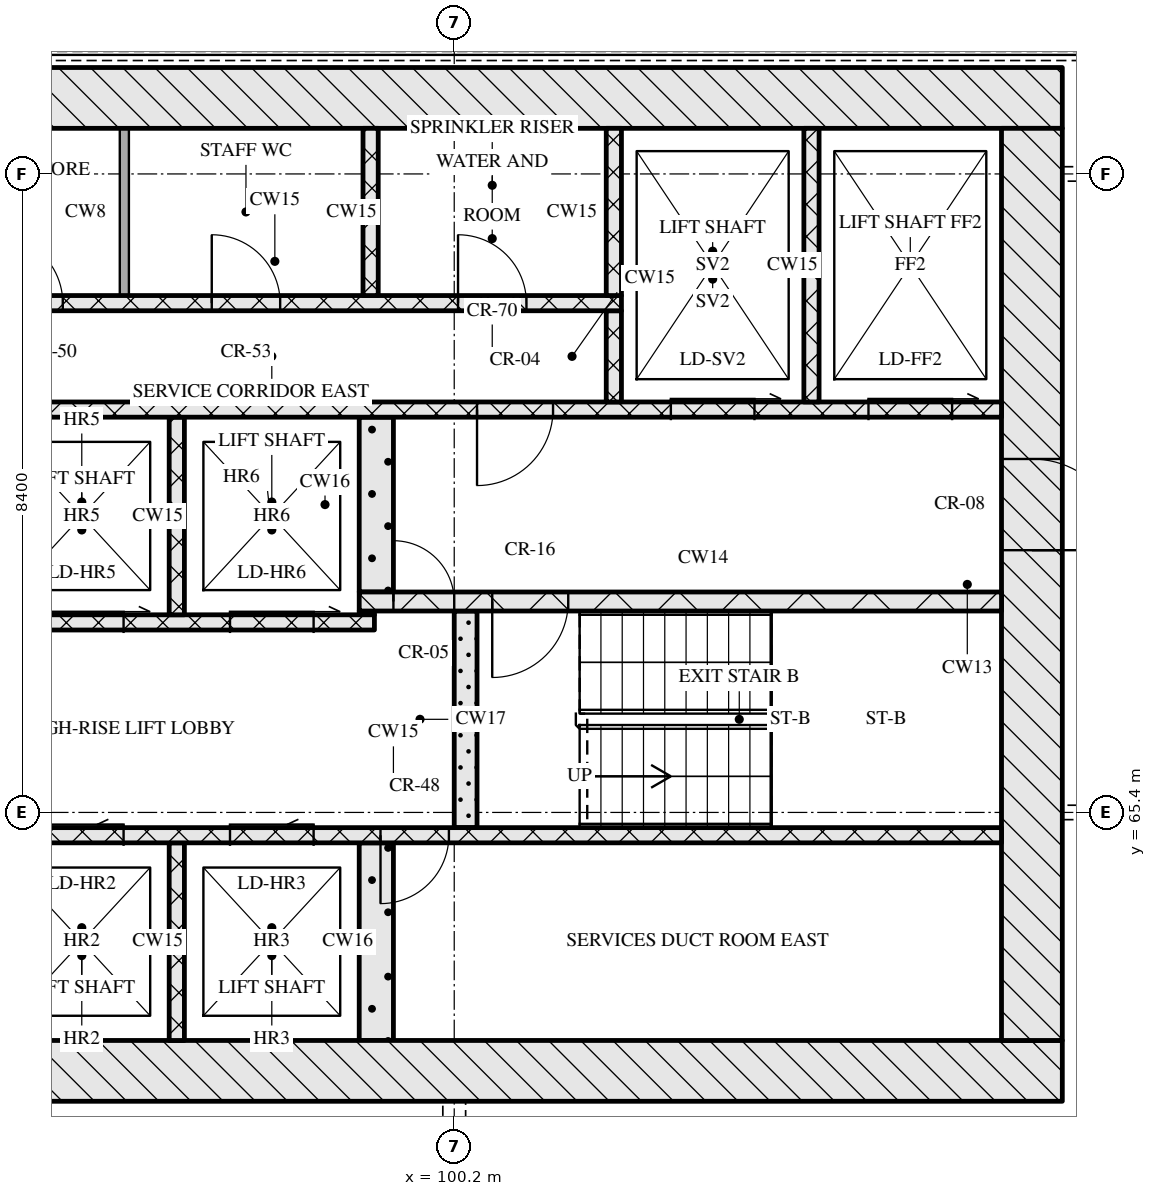
"""IFC4 building model, lengths in metres.
Left out: names, types, materials, properties, quantities, classifications, styles, units other than length and angle.
Written with IfcOpenShell. Run it as: python <this file> out.ifc"""

import sys

from ifc_helpers import new_model, si_unit, direction, frame, frame_2d, origin, place, context, subcontext, project, spatial, rectangle, extrude, element, fill, save


model = new_model("IFC4")
c1 = context("Model", 3, precision=1e-05, world=origin(), true_north=direction((0.0, 1.0)))
c2 = subcontext(c1, "Body", "Model", "MODEL_VIEW")
j1 = project(units=[si_unit("LENGTHUNIT", "METRE"), si_unit("PLANEANGLEUNIT", "RADIAN")], contexts=[c1])
p1 = place(None, origin())
s1 = spatial("IfcSite", under=j1, at=p1, CompositionType="ELEMENT")
p2 = place(p1, origin())
s2 = spatial("IfcBuilding", under=s1, at=p2, CompositionType="ELEMENT")
p3 = place(p2, frame((0.0, 0.0, 154.65)))
s3 = spatial("IfcBuildingStorey", under=s2, at=p3, CompositionType="ELEMENT", Elevation=154.65)
p4 = place(p3, frame((67.0, 62.0, 0.0), z_axis=(0.0, 0.0, 1.0), x_axis=(1.0, 0.0, 0.0)))
e1 = element("IfcWall", 1, at=p4, inside=s3, PredefinedType="SOLIDWALL", context=c2, shape_type="SweptSolid", body=[
    extrude(rectangle(XDim=41.2, YDim=0.8, at=frame_2d((20.6, 0.0))), origin(), (0.0, 0.0, 1.0), 3.32),
])
p5 = place(p4, frame((20.95, 0.0, 0.0)))
e2 = element("IfcOpeningElement", 2, at=p5, cuts=e1, PredefinedType="OPENING", context=c2, shape_type="SweptSolid", body=[
    extrude(rectangle(XDim=1.8, YDim=2.1, at=frame_2d((0.9, 1.05))), frame((0.0, 0.41, 0.0), z_axis=(0.0, -1.0, 0.0), x_axis=(1.0, 0.0, 0.0)), (0.0, 0.0, 1.0), 0.82),
])
p6 = place(p3, frame((67.0, 74.8, 0.0), z_axis=(0.0, 0.0, 1.0), x_axis=(1.0, 0.0, 0.0)))
e3 = element("IfcWall", 3, at=p6, inside=s3, PredefinedType="SOLIDWALL", context=c2, shape_type="SweptSolid", body=[
    extrude(rectangle(XDim=41.2, YDim=0.8, at=frame_2d((20.6, 0.0))), origin(), (0.0, 0.0, 1.0), 3.32),
])
p7 = place(p3, frame((107.8, 62.4, 0.0), z_axis=(0.0, 0.0, 1.0), x_axis=(0.0, 1.0, 0.0)))
e4 = element("IfcWall", 4, at=p7, inside=s3, PredefinedType="SOLIDWALL", context=c2, shape_type="SweptSolid", body=[
    extrude(rectangle(XDim=12.0, YDim=0.8, at=frame_2d((6.0, 0.0))), origin(), (0.0, 0.0, 1.0), 3.32),
])
p8 = place(p7, frame((6.45, 0.0, 0.0)))
e5 = element("IfcOpeningElement", 5, at=p8, cuts=e4, PredefinedType="OPENING", context=c2, shape_type="SweptSolid", body=[
    extrude(rectangle(XDim=1.2, YDim=2.1, at=frame_2d((0.6, 1.05))), frame((0.0, 0.41, 0.0), z_axis=(0.0, -1.0, 0.0), x_axis=(1.0, 0.0, 0.0)), (0.0, 0.0, 1.0), 0.82),
])
p9 = place(p3, frame((96.55, 62.4, 0.0), z_axis=(0.0, 0.0, 1.0), x_axis=(0.0, 1.0, 0.0)))
e6 = element("IfcWall", 6, at=p9, inside=s3, PredefinedType="SOLIDWALL", context=c2, shape_type="SweptSolid", body=[
    extrude(rectangle(XDim=2.6, YDim=0.2, at=frame_2d((1.3, 0.0))), origin(), (0.0, 0.0, 1.0), 3.32),
])
p10 = place(p3, frame((99.175, 62.4, 0.0), z_axis=(0.0, 0.0, 1.0), x_axis=(0.0, 1.0, 0.0)))
e7 = element("IfcWall", 7, at=p10, inside=s3, PredefinedType="SOLIDWALL", context=c2, shape_type="SweptSolid", body=[
    extrude(rectangle(XDim=2.6, YDim=0.45, at=frame_2d((1.3, 0.0))), origin(), (0.0, 0.0, 1.0), 3.32),
])
p11 = place(p3, frame((91.4, 65.1, 0.0), z_axis=(0.0, 0.0, 1.0), x_axis=(1.0, 0.0, 0.0)))
e8 = element("IfcWall", 8, at=p11, inside=s3, PredefinedType="SOLIDWALL", context=c2, shape_type="SweptSolid", body=[
    extrude(rectangle(XDim=16.0, YDim=0.2, at=frame_2d((8.0, 0.0))), origin(), (0.0, 0.0, 1.0), 3.32),
])
p12 = place(p11, frame((0.85, 0.0, 0.0)))
e9 = element("IfcOpeningElement", 9, at=p12, cuts=e8, PredefinedType="OPENING", context=c2, shape_type="SweptSolid", body=[
    extrude(rectangle(XDim=1.1, YDim=2.1, at=frame_2d((0.55, 1.05))), frame((0.0, 0.11, 0.0), z_axis=(0.0, -1.0, 0.0), x_axis=(1.0, 0.0, 0.0)), (0.0, 0.0, 1.0), 0.22),
])
p13 = place(p11, frame((3.35, 0.0, 0.0)))
e10 = element("IfcOpeningElement", 10, at=p13, cuts=e8, PredefinedType="OPENING", context=c2, shape_type="SweptSolid", body=[
    extrude(rectangle(XDim=1.1, YDim=2.1, at=frame_2d((0.55, 1.05))), frame((0.0, 0.11, 0.0), z_axis=(0.0, -1.0, 0.0), x_axis=(1.0, 0.0, 0.0)), (0.0, 0.0, 1.0), 0.22),
])
p14 = place(p11, frame((5.85, 0.0, 0.0)))
e11 = element("IfcOpeningElement", 11, at=p14, cuts=e8, PredefinedType="OPENING", context=c2, shape_type="SweptSolid", body=[
    extrude(rectangle(XDim=1.1, YDim=2.1, at=frame_2d((0.55, 1.05))), frame((0.0, 0.11, 0.0), z_axis=(0.0, -1.0, 0.0), x_axis=(1.0, 0.0, 0.0)), (0.0, 0.0, 1.0), 0.22),
])
p15 = place(p11, frame((7.83, 0.0, 0.0)))
e12 = element("IfcOpeningElement", 12, at=p15, cuts=e8, PredefinedType="OPENING", context=c2, shape_type="SweptSolid", body=[
    extrude(rectangle(XDim=0.9, YDim=2.1, at=frame_2d((0.45, 1.05))), frame((0.0, 0.11, 0.0), z_axis=(0.0, -1.0, 0.0), x_axis=(1.0, 0.0, 0.0)), (0.0, 0.0, 1.0), 0.22),
])
p16 = place(p3, frame((100.35, 65.2, 0.0), z_axis=(0.0, 0.0, 1.0), x_axis=(0.0, 1.0, 0.0)))
e13 = element("IfcWall", 13, at=p16, inside=s3, PredefinedType="SOLIDWALL", context=c2, shape_type="SweptSolid", body=[
    extrude(rectangle(XDim=2.85, YDim=0.3, at=frame_2d((1.425, 0.0))), origin(), (0.0, 0.0, 1.0), 3.32),
])
p17 = place(p3, frame((76.05, 67.9, 0.0), z_axis=(0.0, 0.0, 1.0), x_axis=(1.0, 0.0, 0.0)))
e14 = element("IfcWall", 14, at=p17, inside=s3, PredefinedType="SOLIDWALL", context=c2, shape_type="SweptSolid", body=[
    extrude(rectangle(XDim=23.1, YDim=0.2, at=frame_2d((11.55, 0.0))), origin(), (0.0, 0.0, 1.0), 3.32),
])
p18 = place(p17, frame((1.4, 0.0, 0.0)))
e15 = element("IfcOpeningElement", 15, at=p18, cuts=e14, PredefinedType="OPENING", context=c2, shape_type="SweptSolid", body=[
    extrude(rectangle(XDim=0.9, YDim=2.1, at=frame_2d((0.45, 1.05))), frame((0.0, 0.11, 0.0), z_axis=(0.0, -1.0, 0.0), x_axis=(1.0, 0.0, 0.0)), (0.0, 0.0, 1.0), 0.22),
])
p19 = place(p17, frame((5.11, 0.0, 0.0)))
e16 = element("IfcOpeningElement", 16, at=p19, cuts=e14, PredefinedType="OPENING", context=c2, shape_type="SweptSolid", body=[
    extrude(rectangle(XDim=0.9, YDim=2.1, at=frame_2d((0.45, 1.05))), frame((0.0, 0.11, 0.0), z_axis=(0.0, -1.0, 0.0), x_axis=(1.0, 0.0, 0.0)), (0.0, 0.0, 1.0), 0.22),
])
p20 = place(p17, frame((8.45, 0.0, 0.0)))
e17 = element("IfcOpeningElement", 17, at=p20, cuts=e14, PredefinedType="OPENING", context=c2, shape_type="SweptSolid", body=[
    extrude(rectangle(XDim=0.9, YDim=2.1, at=frame_2d((0.45, 1.05))), frame((0.0, 0.11, 0.0), z_axis=(0.0, -1.0, 0.0), x_axis=(1.0, 0.0, 0.0)), (0.0, 0.0, 1.0), 0.22),
])
p21 = place(p17, frame((10.91, 0.0, 0.0)))
e18 = element("IfcOpeningElement", 18, at=p21, cuts=e14, PredefinedType="OPENING", context=c2, shape_type="SweptSolid", body=[
    extrude(rectangle(XDim=0.9, YDim=2.1, at=frame_2d((0.45, 1.05))), frame((0.0, 0.11, 0.0), z_axis=(0.0, -1.0, 0.0), x_axis=(1.0, 0.0, 0.0)), (0.0, 0.0, 1.0), 0.22),
])
p22 = place(p17, frame((13.55, 0.0, 0.0)))
e19 = element("IfcOpeningElement", 19, at=p22, cuts=e14, PredefinedType="OPENING", context=c2, shape_type="SweptSolid", body=[
    extrude(rectangle(XDim=1.0, YDim=2.1, at=frame_2d((0.5, 1.05))), frame((0.0, 0.11, 0.0), z_axis=(0.0, -1.0, 0.0), x_axis=(1.0, 0.0, 0.0)), (0.0, 0.0, 1.0), 0.22),
])
p23 = place(p17, frame((16.2, 0.0, 0.0)))
e20 = element("IfcOpeningElement", 20, at=p23, cuts=e14, PredefinedType="OPENING", context=c2, shape_type="SweptSolid", body=[
    extrude(rectangle(XDim=1.1, YDim=2.1, at=frame_2d((0.55, 1.05))), frame((0.0, 0.11, 0.0), z_axis=(0.0, -1.0, 0.0), x_axis=(1.0, 0.0, 0.0)), (0.0, 0.0, 1.0), 0.22),
])
p24 = place(p17, frame((18.7, 0.0, 0.0)))
e21 = element("IfcOpeningElement", 21, at=p24, cuts=e14, PredefinedType="OPENING", context=c2, shape_type="SweptSolid", body=[
    extrude(rectangle(XDim=1.1, YDim=2.1, at=frame_2d((0.55, 1.05))), frame((0.0, 0.11, 0.0), z_axis=(0.0, -1.0, 0.0), x_axis=(1.0, 0.0, 0.0)), (0.0, 0.0, 1.0), 0.22),
])
p25 = place(p17, frame((21.2, 0.0, 0.0)))
e22 = element("IfcOpeningElement", 22, at=p25, cuts=e14, PredefinedType="OPENING", context=c2, shape_type="SweptSolid", body=[
    extrude(rectangle(XDim=1.1, YDim=2.1, at=frame_2d((0.55, 1.05))), frame((0.0, 0.11, 0.0), z_axis=(0.0, -1.0, 0.0), x_axis=(1.0, 0.0, 0.0)), (0.0, 0.0, 1.0), 0.22),
])
p26 = place(p3, frame((96.55, 68.0, 0.0), z_axis=(0.0, 0.0, 1.0), x_axis=(0.0, 1.0, 0.0)))
e23 = element("IfcWall", 23, at=p26, inside=s3, PredefinedType="SOLIDWALL", context=c2, shape_type="SweptSolid", body=[
    extrude(rectangle(XDim=2.6, YDim=0.2, at=frame_2d((1.3, 0.0))), origin(), (0.0, 0.0, 1.0), 3.32),
])
p27 = place(p3, frame((98.95, 68.025, 0.0), z_axis=(0.0, 0.0, 1.0), x_axis=(1.0, 0.0, 0.0)))
e24 = element("IfcWall", 24, at=p27, inside=s3, PredefinedType="SOLIDWALL", context=c2, shape_type="SweptSolid", body=[
    extrude(rectangle(XDim=0.2, YDim=0.05, at=frame_2d((0.1, 0.0))), origin(), (0.0, 0.0, 1.0), 3.32),
])
p28 = place(p3, frame((98.95, 68.175, 0.0), z_axis=(0.0, 0.0, 1.0), x_axis=(1.0, 0.0, 0.0)))
e25 = element("IfcWall", 25, at=p28, inside=s3, PredefinedType="SOLIDWALL", context=c2, shape_type="SweptSolid", body=[
    extrude(rectangle(XDim=8.45, YDim=0.25, at=frame_2d((4.225, 0.0))), origin(), (0.0, 0.0, 1.0), 3.32),
])
p29 = place(p28, frame((0.45, 0.0, 0.0)))
e26 = element("IfcOpeningElement", 26, at=p29, cuts=e25, PredefinedType="OPENING", context=c2, shape_type="SweptSolid", body=[
    extrude(rectangle(XDim=0.8, YDim=2.1, at=frame_2d((0.4, 1.05))), frame((0.0, 0.135, 0.0), z_axis=(0.0, -1.0, 0.0), x_axis=(1.0, 0.0, 0.0)), (0.0, 0.0, 1.0), 0.27),
])
p30 = place(p28, frame((1.75, 0.0, 0.0)))
e27 = element("IfcOpeningElement", 27, at=p30, cuts=e25, PredefinedType="OPENING", context=c2, shape_type="SweptSolid", body=[
    extrude(rectangle(XDim=1.0, YDim=2.1, at=frame_2d((0.5, 1.05))), frame((0.0, 0.135, 0.0), z_axis=(0.0, -1.0, 0.0), x_axis=(1.0, 0.0, 0.0)), (0.0, 0.0, 1.0), 0.27),
])
p31 = place(p3, frame((99.175, 68.3, 0.0), z_axis=(0.0, 0.0, 1.0), x_axis=(0.0, 1.0, 0.0)))
e28 = element("IfcWall", 28, at=p31, inside=s3, PredefinedType="SOLIDWALL", context=c2, shape_type="SweptSolid", body=[
    extrude(rectangle(XDim=2.3, YDim=0.45, at=frame_2d((1.15, 0.0))), origin(), (0.0, 0.0, 1.0), 3.32),
])
p32 = place(p3, frame((67.8, 70.7, 0.0), z_axis=(0.0, 0.0, 1.0), x_axis=(1.0, 0.0, 0.0)))
e29 = element("IfcWall", 29, at=p32, inside=s3, PredefinedType="SOLIDWALL", context=c2, shape_type="SweptSolid", body=[
    extrude(rectangle(XDim=39.6, YDim=0.2, at=frame_2d((19.8, 0.0))), origin(), (0.0, 0.0, 1.0), 3.32),
])
p33 = place(p32, frame((0.65, 0.0, 0.0)))
e30 = element("IfcOpeningElement", 30, at=p33, cuts=e29, PredefinedType="OPENING", context=c2, shape_type="SweptSolid", body=[
    extrude(rectangle(XDim=1.1, YDim=2.1, at=frame_2d((0.55, 1.05))), frame((0.0, 0.11, 0.0), z_axis=(0.0, -1.0, 0.0), x_axis=(1.0, 0.0, 0.0)), (0.0, 0.0, 1.0), 0.22),
])
p34 = place(p32, frame((3.25, 0.0, 0.0)))
e31 = element("IfcOpeningElement", 31, at=p34, cuts=e29, PredefinedType="OPENING", context=c2, shape_type="SweptSolid", body=[
    extrude(rectangle(XDim=1.1, YDim=2.1, at=frame_2d((0.55, 1.05))), frame((0.0, 0.11, 0.0), z_axis=(0.0, -1.0, 0.0), x_axis=(1.0, 0.0, 0.0)), (0.0, 0.0, 1.0), 0.22),
])
p35 = place(p32, frame((5.9, 0.0, 0.0)))
e32 = element("IfcOpeningElement", 32, at=p35, cuts=e29, PredefinedType="OPENING", context=c2, shape_type="SweptSolid", body=[
    extrude(rectangle(XDim=1.0, YDim=2.1, at=frame_2d((0.5, 1.05))), frame((0.0, 0.11, 0.0), z_axis=(0.0, -1.0, 0.0), x_axis=(1.0, 0.0, 0.0)), (0.0, 0.0, 1.0), 0.22),
])
p36 = place(p32, frame((21.7, 0.0, 0.0)))
e33 = element("IfcOpeningElement", 33, at=p36, cuts=e29, PredefinedType="OPENING", context=c2, shape_type="SweptSolid", body=[
    extrude(rectangle(XDim=1.0, YDim=2.1, at=frame_2d((0.5, 1.05))), frame((0.0, 0.11, 0.0), z_axis=(0.0, -1.0, 0.0), x_axis=(1.0, 0.0, 0.0)), (0.0, 0.0, 1.0), 0.22),
])
p37 = place(p32, frame((32.7, 0.0, 0.0)))
e34 = element("IfcOpeningElement", 34, at=p37, cuts=e29, PredefinedType="OPENING", context=c2, shape_type="SweptSolid", body=[
    extrude(rectangle(XDim=1.0, YDim=2.1, at=frame_2d((0.5, 1.05))), frame((0.0, 0.11, 0.0), z_axis=(0.0, -1.0, 0.0), x_axis=(1.0, 0.0, 0.0)), (0.0, 0.0, 1.0), 0.22),
])
p38 = place(p32, frame((35.25, 0.0, 0.0)))
e35 = element("IfcOpeningElement", 35, at=p38, cuts=e29, PredefinedType="OPENING", context=c2, shape_type="SweptSolid", body=[
    extrude(rectangle(XDim=1.1, YDim=2.1, at=frame_2d((0.55, 1.05))), frame((0.0, 0.11, 0.0), z_axis=(0.0, -1.0, 0.0), x_axis=(1.0, 0.0, 0.0)), (0.0, 0.0, 1.0), 0.22),
])
p39 = place(p32, frame((37.85, 0.0, 0.0)))
e36 = element("IfcOpeningElement", 36, at=p39, cuts=e29, PredefinedType="OPENING", context=c2, shape_type="SweptSolid", body=[
    extrude(rectangle(XDim=1.1, YDim=2.1, at=frame_2d((0.55, 1.05))), frame((0.0, 0.11, 0.0), z_axis=(0.0, -1.0, 0.0), x_axis=(1.0, 0.0, 0.0)), (0.0, 0.0, 1.0), 0.22),
])
p40 = place(p3, frame((102.3, 70.8, 0.0), z_axis=(0.0, 0.0, 1.0), x_axis=(0.0, 1.0, 0.0)))
e37 = element("IfcWall", 37, at=p40, inside=s3, PredefinedType="SOLIDWALL", context=c2, shape_type="SweptSolid", body=[
    extrude(rectangle(XDim=1.2, YDim=0.2, at=frame_2d((0.6, 0.0))), origin(), (0.0, 0.0, 1.0), 3.32),
])
p41 = place(p3, frame((104.9, 70.8, 0.0), z_axis=(0.0, 0.0, 1.0), x_axis=(0.0, 1.0, 0.0)))
e38 = element("IfcWall", 38, at=p41, inside=s3, PredefinedType="SOLIDWALL", context=c2, shape_type="SweptSolid", body=[
    extrude(rectangle(XDim=3.6, YDim=0.2, at=frame_2d((1.8, 0.0))), origin(), (0.0, 0.0, 1.0), 3.32),
])
p42 = place(p3, frame((93.28, 72.1, 0.0), z_axis=(0.0, 0.0, 1.0), x_axis=(1.0, 0.0, 0.0)))
e39 = element("IfcWall", 39, at=p42, inside=s3, PredefinedType="SOLIDWALL", context=c2, shape_type="SweptSolid", body=[
    extrude(rectangle(XDim=9.12, YDim=0.2, at=frame_2d((4.56, 0.0))), origin(), (0.0, 0.0, 1.0), 3.32),
])
p43 = place(p42, frame((0.87, 0.0, 0.0)))
e40 = element("IfcOpeningElement", 40, at=p43, cuts=e39, PredefinedType="OPENING", context=c2, shape_type="SweptSolid", body=[
    extrude(rectangle(XDim=0.9, YDim=2.1, at=frame_2d((0.45, 1.05))), frame((0.0, 0.11, 0.0), z_axis=(0.0, -1.0, 0.0), x_axis=(1.0, 0.0, 0.0)), (0.0, 0.0, 1.0), 0.22),
])
p44 = place(p42, frame((3.73, 0.0, 0.0)))
e41 = element("IfcOpeningElement", 41, at=p44, cuts=e39, PredefinedType="OPENING", context=c2, shape_type="SweptSolid", body=[
    extrude(rectangle(XDim=0.9, YDim=2.1, at=frame_2d((0.45, 1.05))), frame((0.0, 0.11, 0.0), z_axis=(0.0, -1.0, 0.0), x_axis=(1.0, 0.0, 0.0)), (0.0, 0.0, 1.0), 0.22),
])
p45 = place(p42, frame((6.97, 0.0, 0.0)))
e42 = element("IfcOpeningElement", 42, at=p45, cuts=e39, PredefinedType="OPENING", context=c2, shape_type="SweptSolid", body=[
    extrude(rectangle(XDim=0.9, YDim=2.1, at=frame_2d((0.45, 1.05))), frame((0.0, 0.11, 0.0), z_axis=(0.0, -1.0, 0.0), x_axis=(1.0, 0.0, 0.0)), (0.0, 0.0, 1.0), 0.22),
])
p46 = place(p3, frame((95.86, 72.2, 0.0), z_axis=(0.0, 0.0, 1.0), x_axis=(0.0, 1.0, 0.0)))
e43 = element("IfcWall", 43, at=p46, inside=s3, PredefinedType="PARTITIONING", context=c2, shape_type="SweptSolid", body=[
    extrude(rectangle(XDim=2.2, YDim=0.12, at=frame_2d((1.1, 0.0))), origin(), (0.0, 0.0, 1.0), 3.32),
])
for number, where, z_axis, x_axis in (
    (44, (99.1, 72.2, 0.0), (0.0, 0.0, 1.0), (0.0, 1.0, 0.0)),
    (45, (102.3, 72.2, 0.0), (0.0, 0.0, 1.0), (0.0, 1.0, 0.0)),
):
    element("IfcWall", number, at=place(p3, frame(where, z_axis=z_axis, x_axis=x_axis)), inside=s3, PredefinedType="SOLIDWALL", context=c2, shape_type="SweptSolid", body=[
        extrude(rectangle(XDim=2.2, YDim=0.2, at=frame_2d((1.1, 0.0))), origin(), (0.0, 0.0, 1.0), 3.32),
    ])
p47 = place(p13, origin())
e46 = element("IfcDoor", 46, at=p47, inside=s3, OperationType="SLIDING_TO_LEFT", PredefinedType="DOOR", context=c2, shape_type="SweptSolid", body=[
    extrude(rectangle(XDim=1.1, YDim=2.1, at=frame_2d((0.55, 1.05))), frame((0.0, 0.025, 0.0), z_axis=(0.0, -1.0, 0.0), x_axis=(1.0, 0.0, 0.0)), (0.0, 0.0, 1.0), 0.05),
])
fill(e10, e46)
p48 = place(p14, origin())
e47 = element("IfcDoor", 47, at=p48, inside=s3, OperationType="SLIDING_TO_LEFT", PredefinedType="DOOR", context=c2, shape_type="SweptSolid", body=[
    extrude(rectangle(XDim=1.1, YDim=2.1, at=frame_2d((0.55, 1.05))), frame((0.0, 0.025, 0.0), z_axis=(0.0, -1.0, 0.0), x_axis=(1.0, 0.0, 0.0)), (0.0, 0.0, 1.0), 0.05),
])
fill(e11, e47)
p49 = place(p15, origin())
e48 = element("IfcDoor", 48, at=p49, inside=s3, OperationType="SINGLE_SWING_RIGHT", PredefinedType="DOOR", context=c2, shape_type="SweptSolid", body=[
    extrude(rectangle(XDim=0.9, YDim=2.1, at=frame_2d((0.45, 1.05))), frame((0.0, 0.025, 0.0), z_axis=(0.0, -1.0, 0.0), x_axis=(1.0, 0.0, 0.0)), (0.0, 0.0, 1.0), 0.05),
])
fill(e12, e48)
p50 = place(p24, origin())
e49 = element("IfcDoor", 49, at=p50, inside=s3, OperationType="SLIDING_TO_RIGHT", PredefinedType="DOOR", context=c2, shape_type="SweptSolid", body=[
    extrude(rectangle(XDim=1.1, YDim=2.1, at=frame_2d((0.55, 1.05))), frame((0.0, 0.025, 0.0), z_axis=(0.0, -1.0, 0.0), x_axis=(1.0, 0.0, 0.0)), (0.0, 0.0, 1.0), 0.05),
])
fill(e21, e49)
p51 = place(p25, origin())
e50 = element("IfcDoor", 50, at=p51, inside=s3, OperationType="SLIDING_TO_RIGHT", PredefinedType="DOOR", context=c2, shape_type="SweptSolid", body=[
    extrude(rectangle(XDim=1.1, YDim=2.1, at=frame_2d((0.55, 1.05))), frame((0.0, 0.025, 0.0), z_axis=(0.0, -1.0, 0.0), x_axis=(1.0, 0.0, 0.0)), (0.0, 0.0, 1.0), 0.05),
])
fill(e22, e50)
p52 = place(p29, origin())
e51 = element("IfcDoor", 51, at=p52, inside=s3, OperationType="SINGLE_SWING_LEFT", PredefinedType="DOOR", context=c2, shape_type="SweptSolid", body=[
    extrude(rectangle(XDim=0.8, YDim=2.1, at=frame_2d((0.4, 1.05))), frame((0.0, 0.025, 0.0), z_axis=(0.0, -1.0, 0.0), x_axis=(1.0, 0.0, 0.0)), (0.0, 0.0, 1.0), 0.05),
])
fill(e26, e51)
p53 = place(p30, origin())
e52 = element("IfcDoor", 52, at=p53, inside=s3, OperationType="SINGLE_SWING_RIGHT", PredefinedType="DOOR", context=c2, shape_type="SweptSolid", body=[
    extrude(rectangle(XDim=1.0, YDim=2.1, at=frame_2d((0.5, 1.05))), frame((0.0, 0.025, 0.0), z_axis=(0.0, -1.0, 0.0), x_axis=(1.0, 0.0, 0.0)), (0.0, 0.0, 1.0), 0.05),
])
fill(e27, e52)
p54 = place(p8, origin())
e53 = element("IfcDoor", 53, at=p54, inside=s3, OperationType="SINGLE_SWING_RIGHT", PredefinedType="DOOR", context=c2, shape_type="SweptSolid", body=[
    extrude(rectangle(XDim=1.2, YDim=2.1, at=frame_2d((0.6, 1.05))), frame((0.0, 0.025, 0.0), z_axis=(0.0, -1.0, 0.0), x_axis=(1.0, 0.0, 0.0)), (0.0, 0.0, 1.0), 0.05),
])
fill(e5, e53)
p55 = place(p37, origin())
e54 = element("IfcDoor", 54, at=p55, inside=s3, OperationType="SINGLE_SWING_RIGHT", PredefinedType="DOOR", context=c2, shape_type="SweptSolid", body=[
    extrude(rectangle(XDim=1.0, YDim=2.1, at=frame_2d((0.5, 1.05))), frame((0.0, 0.025, 0.0), z_axis=(0.0, -1.0, 0.0), x_axis=(1.0, 0.0, 0.0)), (0.0, 0.0, 1.0), 0.05),
])
fill(e34, e54)
p56 = place(p38, origin())
e55 = element("IfcDoor", 55, at=p56, inside=s3, OperationType="SLIDING_TO_RIGHT", PredefinedType="DOOR", context=c2, shape_type="SweptSolid", body=[
    extrude(rectangle(XDim=1.1, YDim=2.1, at=frame_2d((0.55, 1.05))), frame((0.0, 0.025, 0.0), z_axis=(0.0, -1.0, 0.0), x_axis=(1.0, 0.0, 0.0)), (0.0, 0.0, 1.0), 0.05),
])
fill(e35, e55)
p57 = place(p39, origin())
e56 = element("IfcDoor", 56, at=p57, inside=s3, OperationType="SLIDING_TO_RIGHT", PredefinedType="DOOR", context=c2, shape_type="SweptSolid", body=[
    extrude(rectangle(XDim=1.1, YDim=2.1, at=frame_2d((0.55, 1.05))), frame((0.0, 0.025, 0.0), z_axis=(0.0, -1.0, 0.0), x_axis=(1.0, 0.0, 0.0)), (0.0, 0.0, 1.0), 0.05),
])
fill(e36, e56)
p58 = place(p43, origin())
e57 = element("IfcDoor", 57, at=p58, inside=s3, OperationType="SINGLE_SWING_LEFT", PredefinedType="DOOR", context=c2, shape_type="SweptSolid", body=[
    extrude(rectangle(XDim=0.9, YDim=2.1, at=frame_2d((0.45, 1.05))), frame((0.0, 0.025, 0.0), z_axis=(0.0, -1.0, 0.0), x_axis=(1.0, 0.0, 0.0)), (0.0, 0.0, 1.0), 0.05),
])
fill(e40, e57)
p59 = place(p44, origin())
e58 = element("IfcDoor", 58, at=p59, inside=s3, OperationType="SINGLE_SWING_LEFT", PredefinedType="DOOR", context=c2, shape_type="SweptSolid", body=[
    extrude(rectangle(XDim=0.9, YDim=2.1, at=frame_2d((0.45, 1.05))), frame((0.0, 0.025, 0.0), z_axis=(0.0, -1.0, 0.0), x_axis=(1.0, 0.0, 0.0)), (0.0, 0.0, 1.0), 0.05),
])
fill(e41, e58)
p60 = place(p45, origin())
e59 = element("IfcDoor", 59, at=p60, inside=s3, OperationType="SINGLE_SWING_LEFT", PredefinedType="DOOR", context=c2, shape_type="SweptSolid", body=[
    extrude(rectangle(XDim=0.9, YDim=2.1, at=frame_2d((0.45, 1.05))), frame((0.0, 0.025, 0.0), z_axis=(0.0, -1.0, 0.0), x_axis=(1.0, 0.0, 0.0)), (0.0, 0.0, 1.0), 0.05),
])
fill(e42, e59)
save(model, sys.argv[1])
